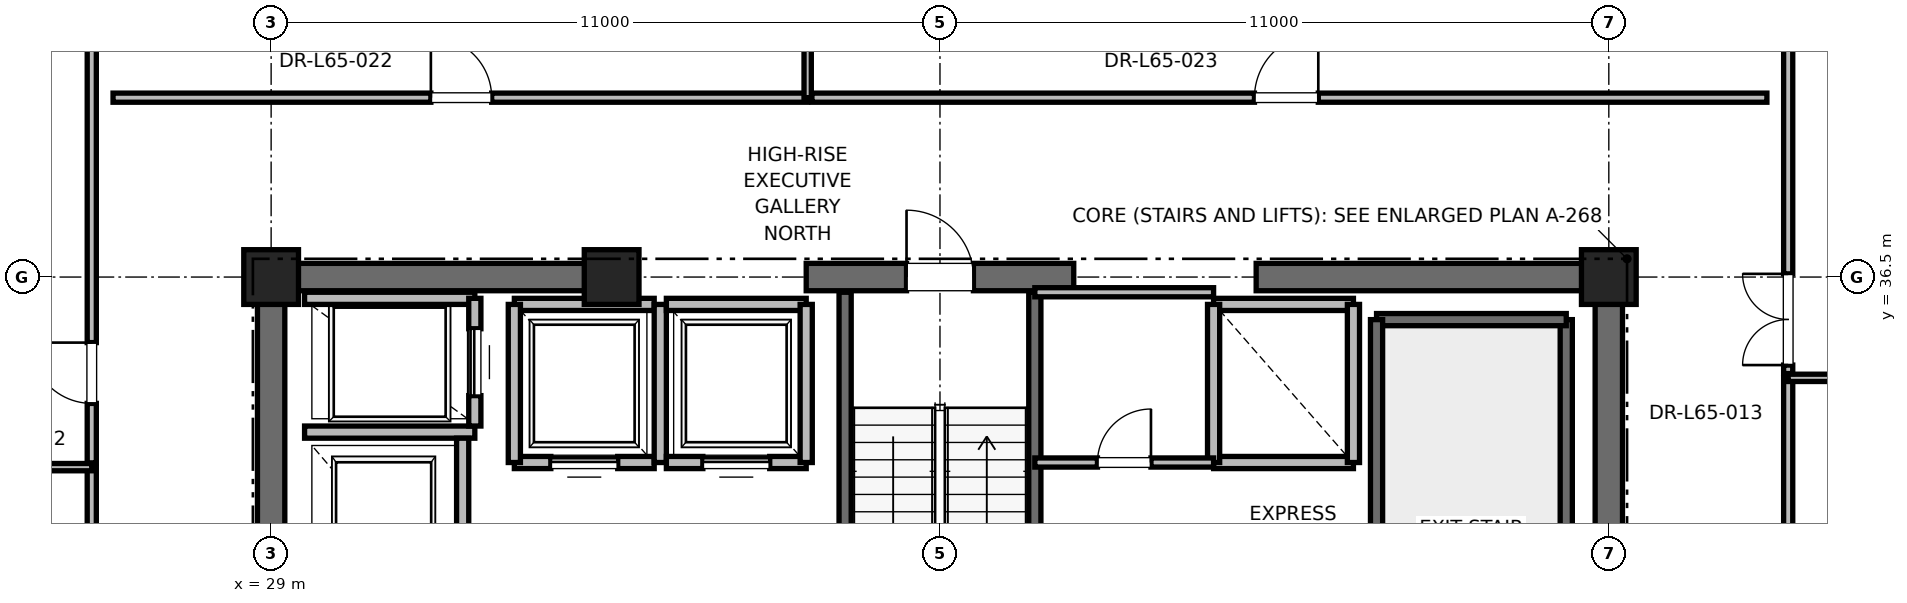
"""IFC4 building model, lengths in metres.
Left out: names, types, materials, properties, quantities, classifications, styles, units other than length and angle.
Written with IfcOpenShell. Run it as: python <this file> out.ifc"""

import sys

from ifc_helpers import new_model, si_unit, direction, frame, frame_2d, origin, origin_2d, place, context, subcontext, project, spatial, rectangle, extrude, element, fill, save


model = new_model("IFC4")
c1 = context("Model", 3, precision=1e-05, world=origin(), true_north=direction((0.0, 1.0)))
c2 = subcontext(c1, "Body", "Model", "MODEL_VIEW")
j1 = project(units=[si_unit("LENGTHUNIT", "METRE"), si_unit("PLANEANGLEUNIT", "RADIAN")], contexts=[c1])
p1 = place(None, origin())
s1 = spatial("IfcSite", under=j1, at=p1, CompositionType="ELEMENT")
p2 = place(p1, origin())
s2 = spatial("IfcBuilding", under=s1, at=p2, CompositionType="ELEMENT")
p3 = place(p2, frame((0.0, 0.0, 279.2)))
s3 = spatial("IfcBuildingStorey", under=s2, at=p3, CompositionType="ELEMENT", Elevation=279.2)
for number, where, z_axis, x_axis in (
    (1, (29.0, 36.5, 0.0), (0.0, 0.0, 1.0), (1.0, 0.0, 0.0)),
    (2, (51.0, 36.5, 0.0), (0.0, 0.0, 1.0), (1.0, 0.0, 0.0)),
    (3, (34.6, 36.5, 0.0), (0.0, 0.0, 1.0), (1.0, 0.0, 0.0)),
):
    element("IfcColumn", number, at=place(p3, frame(where, z_axis=z_axis, x_axis=x_axis)), inside=s3, PredefinedType="PILASTER", context=c2, shape_type="SweptSolid", body=[
        extrude(rectangle(XDim=0.9, YDim=0.9, at=origin_2d()), origin(), (0.0, 0.0, 1.0), 4.0),
    ])
p4 = place(p3, frame((29.0, 36.5, 0.0), z_axis=(0.0, 0.0, 1.0), x_axis=(1.0, 0.0, 0.0)))
e4 = element("IfcWall", 4, at=p4, inside=s3, PredefinedType="SHEAR", context=c2, shape_type="SweptSolid", body=[
    extrude(rectangle(XDim=5.8, YDim=0.45, at=frame_2d((2.9, 0.0))), origin(), (0.0, 0.0, 1.0), 3.785),
])
p5 = place(p3, frame((37.8, 36.5, 0.0), z_axis=(0.0, 0.0, 1.0), x_axis=(1.0, 0.0, 0.0)))
e5 = element("IfcWall", 5, at=p5, inside=s3, PredefinedType="SHEAR", context=c2, shape_type="SweptSolid", body=[
    extrude(rectangle(XDim=4.4, YDim=0.45, at=frame_2d((2.2, 0.0))), origin(), (0.0, 0.0, 1.0), 3.785),
])
p6 = place(p5, frame((1.65, 0.0, 0.0)))
e6 = element("IfcOpeningElement", 6, at=p6, cuts=e5, PredefinedType="OPENING", context=c2, shape_type="SweptSolid", body=[
    extrude(rectangle(XDim=1.1, YDim=2.15, at=frame_2d((0.55, 1.075))), frame((0.0, 0.225, 0.0), z_axis=(0.0, -1.0, 0.0), x_axis=(1.0, 0.0, 0.0)), (0.0, 0.0, 1.0), 0.45),
])
for number, where, z_axis, x_axis in (
    (7, (45.2, 36.5, 0.0), (0.0, 0.0, 1.0), (1.0, 0.0, 0.0)),
    (8, (29.0, 30.7, 0.0), (0.0, 0.0, 1.0), (0.0, 1.0, 0.0)),
):
    element("IfcWall", number, at=place(p3, frame(where, z_axis=z_axis, x_axis=x_axis)), inside=s3, PredefinedType="SHEAR", context=c2, shape_type="SweptSolid", body=[
        extrude(rectangle(XDim=5.8, YDim=0.45, at=frame_2d((2.9, 0.0))), origin(), (0.0, 0.0, 1.0), 3.785),
    ])
p7 = place(p3, frame((51.0, 27.7, 0.0), z_axis=(0.0, 0.0, 1.0), x_axis=(0.0, 1.0, 0.0)))
e9 = element("IfcWall", 9, at=p7, inside=s3, PredefinedType="SHEAR", context=c2, shape_type="SweptSolid", body=[
    extrude(rectangle(XDim=8.8, YDim=0.45, at=frame_2d((4.4, 0.0))), origin(), (0.0, 0.0, 1.0), 3.785),
])
p8 = place(p3, frame((50.3, 27.65, 0.0), z_axis=(0.0, 0.0, 1.0), x_axis=(0.0, 1.0, 0.0)))
e10 = element("IfcWall", 10, at=p8, inside=s3, PredefinedType="SOLIDWALL", context=c2, shape_type="SweptSolid", body=[
    extrude(rectangle(XDim=8.15, YDim=0.2, at=frame_2d((4.075, 0.0))), origin(), (0.0, 0.0, 1.0), 3.785),
])
p9 = place(p3, frame((47.18, 35.8, 0.0), z_axis=(0.0, 0.0, 1.0), x_axis=(1.0, 0.0, 0.0)))
e11 = element("IfcWall", 11, at=p9, inside=s3, PredefinedType="SOLIDWALL", context=c2, shape_type="SweptSolid", body=[
    extrude(rectangle(XDim=3.12, YDim=0.2, at=frame_2d((1.56, 0.0))), origin(), (0.0, 0.0, 1.0), 3.785),
])
p10 = place(p3, frame((47.18, 27.62, 0.0), z_axis=(0.0, 0.0, 1.0), x_axis=(0.0, 1.0, 0.0)))
e12 = element("IfcWall", 12, at=p10, inside=s3, PredefinedType="SOLIDWALL", context=c2, shape_type="SweptSolid", body=[
    extrude(rectangle(XDim=8.18, YDim=0.2, at=frame_2d((4.09, 0.0))), origin(), (0.0, 0.0, 1.0), 3.785),
])
p11 = place(p3, frame((38.44, 27.38, 0.0), z_axis=(0.0, 0.0, 1.0), x_axis=(0.0, 1.0, 0.0)))
e13 = element("IfcWall", 13, at=p11, inside=s3, PredefinedType="SOLIDWALL", context=c2, shape_type="SweptSolid", body=[
    extrude(rectangle(XDim=8.87, YDim=0.2, at=frame_2d((4.435, 0.0))), origin(), (0.0, 0.0, 1.0), 3.785),
])
p12 = place(p3, frame((41.56, 27.68, 0.0), z_axis=(0.0, 0.0, 1.0), x_axis=(0.0, 1.0, 0.0)))
e14 = element("IfcWall", 14, at=p12, inside=s3, PredefinedType="SOLIDWALL", context=c2, shape_type="SweptSolid", body=[
    extrude(rectangle(XDim=8.57, YDim=0.2, at=frame_2d((4.285, 0.0))), origin(), (0.0, 0.0, 1.0), 3.785),
])
p13 = place(p3, frame((29.55, 33.95, 0.0), z_axis=(0.0, 0.0, 1.0), x_axis=(1.0, 0.0, 0.0)))
e15 = element("IfcWall", 15, at=p13, inside=s3, PredefinedType="SOLIDWALL", context=c2, shape_type="SweptSolid", body=[
    extrude(rectangle(XDim=2.8, YDim=0.2, at=frame_2d((1.4, 0.0))), origin(), (0.0, 0.0, 1.0), 3.785),
])
p14 = place(p3, frame((32.15, 30.85, 0.0), z_axis=(0.0, 0.0, 1.0), x_axis=(0.0, 1.0, 0.0)))
e16 = element("IfcWall", 16, at=p14, inside=s3, PredefinedType="SOLIDWALL", context=c2, shape_type="SweptSolid", body=[
    extrude(rectangle(XDim=3.0, YDim=0.2, at=frame_2d((1.5, 0.0))), origin(), (0.0, 0.0, 1.0), 3.785),
])
p15 = place(p3, frame((32.35, 36.15, 0.0), z_axis=(0.0, 0.0, 1.0), x_axis=(-1.0, 0.0, 0.0)))
e17 = element("IfcWall", 17, at=p15, inside=s3, PredefinedType="SOLIDWALL", context=c2, shape_type="SweptSolid", body=[
    extrude(rectangle(XDim=2.8, YDim=0.2, at=frame_2d((1.4, 0.0))), origin(), (0.0, 0.0, 1.0), 3.148),
])
p16 = place(p3, frame((32.35, 34.05, 0.0), z_axis=(0.0, 0.0, 1.0), x_axis=(0.0, 1.0, 0.0)))
e18 = element("IfcWall", 18, at=p16, inside=s3, PredefinedType="SOLIDWALL", context=c2, shape_type="SweptSolid", body=[
    extrude(rectangle(XDim=2.1, YDim=0.2, at=frame_2d((1.05, 0.0))), origin(), (0.0, 0.0, 1.0), 3.785),
])
p17 = place(p16, frame((0.5, 0.0, 0.0)))
e19 = element("IfcOpeningElement", 19, at=p17, cuts=e18, PredefinedType="OPENING", context=c2, shape_type="SweptSolid", body=[
    extrude(rectangle(XDim=1.1, YDim=2.2, at=frame_2d((0.55, 1.1))), frame((0.0, 0.1, 0.0), z_axis=(0.0, -1.0, 0.0), x_axis=(1.0, 0.0, 0.0)), (0.0, 0.0, 1.0), 0.2),
])
p18 = place(p3, frame((33.0, 33.45, 0.0), z_axis=(0.0, 0.0, 1.0), x_axis=(1.0, 0.0, 0.0)))
e20 = element("IfcWall", 20, at=p18, inside=s3, PredefinedType="SOLIDWALL", context=c2, shape_type="SweptSolid", body=[
    extrude(rectangle(XDim=2.3, YDim=0.2, at=frame_2d((1.15, 0.0))), origin(), (0.0, 0.0, 1.0), 3.785),
])
p19 = place(p18, frame((0.6, 0.0, 0.0)))
e21 = element("IfcOpeningElement", 21, at=p19, cuts=e20, PredefinedType="OPENING", context=c2, shape_type="SweptSolid", body=[
    extrude(rectangle(XDim=1.1, YDim=2.2, at=frame_2d((0.55, 1.1))), frame((0.0, 0.1, 0.0), z_axis=(0.0, -1.0, 0.0), x_axis=(1.0, 0.0, 0.0)), (0.0, 0.0, 1.0), 0.2),
])
p20 = place(p3, frame((35.3, 36.05, 0.0), z_axis=(0.0, 0.0, 1.0), x_axis=(-1.0, 0.0, 0.0)))
e22 = element("IfcWall", 22, at=p20, inside=s3, PredefinedType="SOLIDWALL", context=c2, shape_type="SweptSolid", body=[
    extrude(rectangle(XDim=2.3, YDim=0.2, at=frame_2d((1.15, 0.0))), origin(), (0.0, 0.0, 1.0), 2.865),
])
p21 = place(p3, frame((33.0, 36.05, 0.0), z_axis=(0.0, 0.0, 1.0), x_axis=(0.0, -1.0, 0.0)))
e23 = element("IfcWall", 23, at=p21, inside=s3, PredefinedType="SOLIDWALL", context=c2, shape_type="SweptSolid", body=[
    extrude(rectangle(XDim=2.6, YDim=0.2, at=frame_2d((1.3, 0.0))), origin(), (0.0, 0.0, 1.0), 3.785),
])
p22 = place(p3, frame((35.4, 33.45, 0.0), z_axis=(0.0, 0.0, 1.0), x_axis=(0.0, 1.0, 0.0)))
e24 = element("IfcWall", 24, at=p22, inside=s3, PredefinedType="SOLIDWALL", context=c2, shape_type="SweptSolid", body=[
    extrude(rectangle(XDim=2.6, YDim=0.2, at=frame_2d((1.3, 0.0))), origin(), (0.0, 0.0, 1.0), 2.865),
])
p23 = place(p3, frame((35.5, 33.45, 0.0), z_axis=(0.0, 0.0, 1.0), x_axis=(1.0, 0.0, 0.0)))
e25 = element("IfcWall", 25, at=p23, inside=s3, PredefinedType="SOLIDWALL", context=c2, shape_type="SweptSolid", body=[
    extrude(rectangle(XDim=2.3, YDim=0.2, at=frame_2d((1.15, 0.0))), origin(), (0.0, 0.0, 1.0), 3.785),
])
p24 = place(p23, frame((0.6, 0.0, 0.0)))
e26 = element("IfcOpeningElement", 26, at=p24, cuts=e25, PredefinedType="OPENING", context=c2, shape_type="SweptSolid", body=[
    extrude(rectangle(XDim=1.1, YDim=2.2, at=frame_2d((0.55, 1.1))), frame((0.0, 0.1, 0.0), z_axis=(0.0, -1.0, 0.0), x_axis=(1.0, 0.0, 0.0)), (0.0, 0.0, 1.0), 0.2),
])
p25 = place(p3, frame((37.8, 36.05, 0.0), z_axis=(0.0, 0.0, 1.0), x_axis=(-1.0, 0.0, 0.0)))
e27 = element("IfcWall", 27, at=p25, inside=s3, PredefinedType="SOLIDWALL", context=c2, shape_type="SweptSolid", body=[
    extrude(rectangle(XDim=2.3, YDim=0.2, at=frame_2d((1.15, 0.0))), origin(), (0.0, 0.0, 1.0), 2.865),
])
p26 = place(p3, frame((37.8, 33.45, 0.0), z_axis=(0.0, 0.0, 1.0), x_axis=(0.0, 1.0, 0.0)))
e28 = element("IfcWall", 28, at=p26, inside=s3, PredefinedType="SOLIDWALL", context=c2, shape_type="SweptSolid", body=[
    extrude(rectangle(XDim=2.6, YDim=0.2, at=frame_2d((1.3, 0.0))), origin(), (0.0, 0.0, 1.0), 2.865),
])
p27 = place(p3, frame((44.5, 33.45, 0.0), z_axis=(0.0, 0.0, 1.0), x_axis=(1.0, 0.0, 0.0)))
e29 = element("IfcWall", 29, at=p27, inside=s3, PredefinedType="SOLIDWALL", context=c2, shape_type="SweptSolid", body=[
    extrude(rectangle(XDim=2.3, YDim=0.2, at=frame_2d((1.15, 0.0))), origin(), (0.0, 0.0, 1.0), 3.785),
])
p28 = place(p3, frame((46.8, 36.05, 0.0), z_axis=(0.0, 0.0, 1.0), x_axis=(-1.0, 0.0, 0.0)))
e30 = element("IfcWall", 30, at=p28, inside=s3, PredefinedType="SOLIDWALL", context=c2, shape_type="SweptSolid", body=[
    extrude(rectangle(XDim=2.3, YDim=0.2, at=frame_2d((1.15, 0.0))), origin(), (0.0, 0.0, 1.0), 2.865),
])
p29 = place(p3, frame((44.5, 36.05, 0.0), z_axis=(0.0, 0.0, 1.0), x_axis=(0.0, -1.0, 0.0)))
e31 = element("IfcWall", 31, at=p29, inside=s3, PredefinedType="SOLIDWALL", context=c2, shape_type="SweptSolid", body=[
    extrude(rectangle(XDim=2.6, YDim=0.2, at=frame_2d((1.3, 0.0))), origin(), (0.0, 0.0, 1.0), 2.865),
])
p30 = place(p3, frame((46.8, 33.45, 0.0), z_axis=(0.0, 0.0, 1.0), x_axis=(0.0, 1.0, 0.0)))
e32 = element("IfcWall", 32, at=p30, inside=s3, PredefinedType="SOLIDWALL", context=c2, shape_type="SweptSolid", body=[
    extrude(rectangle(XDim=2.6, YDim=0.2, at=frame_2d((1.3, 0.0))), origin(), (0.0, 0.0, 1.0), 3.785),
])
p31 = place(p3, frame((41.56, 36.25, 0.0), z_axis=(0.0, 0.0, 1.0), x_axis=(1.0, 0.0, 0.0)))
e33 = element("IfcWall", 33, at=p31, inside=s3, PredefinedType="PARTITIONING", context=c2, shape_type="SweptSolid", body=[
    extrude(rectangle(XDim=2.94, YDim=0.15, at=frame_2d((1.47, 0.0))), origin(), (0.0, 0.0, 1.0), 2.85),
])
p32 = place(p3, frame((41.56, 33.45, 0.0), z_axis=(0.0, 0.0, 1.0), x_axis=(1.0, 0.0, 0.0)))
e34 = element("IfcWall", 34, at=p32, inside=s3, PredefinedType="PARTITIONING", context=c2, shape_type="SweptSolid", body=[
    extrude(rectangle(XDim=2.94, YDim=0.15, at=frame_2d((1.47, 0.0))), origin(), (0.0, 0.0, 1.0), 2.85),
])
p33 = place(p32, frame((1.03, 0.0, 0.0)))
e35 = element("IfcOpeningElement", 35, at=p33, cuts=e34, PredefinedType="OPENING", context=c2, shape_type="SweptSolid", body=[
    extrude(rectangle(XDim=0.88, YDim=2.1, at=frame_2d((0.44, 1.05))), frame((0.0, 0.075, 0.0), z_axis=(0.0, -1.0, 0.0), x_axis=(1.0, 0.0, 0.0)), (0.0, 0.0, 1.0), 0.15),
])
p34 = place(p3, frame((26.4, 39.45, 0.0), z_axis=(0.0, 0.0, 1.0), x_axis=(1.0, 0.0, 0.0)))
e36 = element("IfcWall", 36, at=p34, inside=s3, PredefinedType="PARTITIONING", context=c2, shape_type="SweptSolid", body=[
    extrude(rectangle(XDim=11.424, YDim=0.15, at=frame_2d((5.712, 0.0))), origin(), (0.0, 0.0, 1.0), 2.85),
])
p35 = place(p34, frame((5.227, 0.0, 0.0)))
e37 = element("IfcOpeningElement", 37, at=p35, cuts=e36, PredefinedType="OPENING", context=c2, shape_type="SweptSolid", body=[
    extrude(rectangle(XDim=1.0, YDim=2.15, at=frame_2d((0.5, 1.075))), frame((0.0, 0.075, 0.0), z_axis=(0.0, -1.0, 0.0), x_axis=(1.0, 0.0, 0.0)), (0.0, 0.0, 1.0), 0.15),
])
p36 = place(p3, frame((37.824, 39.45, 0.0), z_axis=(0.0, 0.0, 1.0), x_axis=(0.0, 1.0, 0.0)))
e38 = element("IfcWall", 38, at=p36, inside=s3, PredefinedType="PARTITIONING", context=c2, shape_type="SweptSolid", body=[
    extrude(rectangle(XDim=10.206, YDim=0.12, at=frame_2d((5.103, 0.0))), origin(), (0.0, 0.0, 1.0), 2.415),
])
p37 = place(p3, frame((37.894, 39.45, 0.0), z_axis=(0.0, 0.0, 1.0), x_axis=(1.0, 0.0, 0.0)))
e39 = element("IfcWall", 39, at=p37, inside=s3, PredefinedType="PARTITIONING", context=c2, shape_type="SweptSolid", body=[
    extrude(rectangle(XDim=15.706, YDim=0.15, at=frame_2d((7.853, 0.0))), origin(), (0.0, 0.0, 1.0), 2.85),
])
p38 = place(p37, frame((7.278, 0.0, 0.0)))
e40 = element("IfcOpeningElement", 40, at=p38, cuts=e39, PredefinedType="OPENING", context=c2, shape_type="SweptSolid", body=[
    extrude(rectangle(XDim=1.05, YDim=2.2, at=frame_2d((0.525, 1.1))), frame((0.0, 0.075, 0.0), z_axis=(0.0, -1.0, 0.0), x_axis=(1.0, 0.0, 0.0)), (0.0, 0.0, 1.0), 0.15),
])
p39 = place(p3, frame((26.05, 20.228, 0.0), z_axis=(0.0, 0.0, 1.0), x_axis=(0.0, 1.0, 0.0)))
e41 = element("IfcWall", 41, at=p39, inside=s3, PredefinedType="PARTITIONING", context=c2, shape_type="SweptSolid", body=[
    extrude(rectangle(XDim=13.146, YDim=0.15, at=frame_2d((6.573, 0.0))), origin(), (0.0, 0.0, 1.0), 2.85),
])
p40 = place(p39, frame((6.038, 0.0, 0.0)))
e42 = element("IfcOpeningElement", 42, at=p40, cuts=e41, PredefinedType="OPENING", context=c2, shape_type="SweptSolid", body=[
    extrude(rectangle(XDim=1.0, YDim=2.15, at=frame_2d((0.5, 1.075))), frame((0.0, 0.075, 0.0), z_axis=(0.0, -1.0, 0.0), x_axis=(1.0, 0.0, 0.0)), (0.0, 0.0, 1.0), 0.15),
])
p41 = place(p3, frame((14.29, 33.374, 0.0), z_axis=(0.0, 0.0, 1.0), x_axis=(1.0, 0.0, 0.0)))
e43 = element("IfcWall", 43, at=p41, inside=s3, PredefinedType="PARTITIONING", context=c2, shape_type="SweptSolid", body=[
    extrude(rectangle(XDim=11.76, YDim=0.12, at=frame_2d((5.88, 0.0))), origin(), (0.0, 0.0, 1.0), 2.85),
])
p42 = place(p3, frame((26.05, 33.444, 0.0), z_axis=(0.0, 0.0, 1.0), x_axis=(0.0, 1.0, 0.0)))
e44 = element("IfcWall", 44, at=p42, inside=s3, PredefinedType="PARTITIONING", context=c2, shape_type="SweptSolid", body=[
    extrude(rectangle(XDim=12.412, YDim=0.15, at=frame_2d((6.206, 0.0))), origin(), (0.0, 0.0, 1.0), 2.85),
])
p43 = place(p42, frame((0.978, 0.0, 0.0)))
e45 = element("IfcOpeningElement", 45, at=p43, cuts=e44, PredefinedType="OPENING", context=c2, shape_type="SweptSolid", body=[
    extrude(rectangle(XDim=1.0, YDim=2.15, at=frame_2d((0.5, 1.075))), frame((0.0, 0.075, 0.0), z_axis=(0.0, -1.0, 0.0), x_axis=(1.0, 0.0, 0.0)), (0.0, 0.0, 1.0), 0.15),
])
p44 = place(p3, frame((53.95, 22.43, 0.0), z_axis=(0.0, 0.0, 1.0), x_axis=(0.0, 1.0, 0.0)))
e46 = element("IfcWall", 46, at=p44, inside=s3, PredefinedType="PARTITIONING", context=c2, shape_type="SweptSolid", body=[
    extrude(rectangle(XDim=12.412, YDim=0.15, at=frame_2d((6.206, 0.0))), origin(), (0.0, 0.0, 1.0), 2.85),
])
p45 = place(p44, frame((5.646, 0.0, 0.0)))
e47 = element("IfcOpeningElement", 47, at=p45, cuts=e46, PredefinedType="OPENING", context=c2, shape_type="SweptSolid", body=[
    extrude(rectangle(XDim=1.05, YDim=2.2, at=frame_2d((0.525, 1.1))), frame((0.0, 0.075, 0.0), z_axis=(0.0, -1.0, 0.0), x_axis=(1.0, 0.0, 0.0)), (0.0, 0.0, 1.0), 0.15),
])
p46 = place(p3, frame((53.95, 34.843, 0.0), z_axis=(0.0, 0.0, 1.0), x_axis=(1.0, 0.0, 0.0)))
e48 = element("IfcWall", 48, at=p46, inside=s3, PredefinedType="PARTITIONING", context=c2, shape_type="SweptSolid", body=[
    extrude(rectangle(XDim=11.76, YDim=0.12, at=frame_2d((5.88, 0.0))), origin(), (0.0, 0.0, 1.0), 2.85),
])
p47 = place(p3, frame((53.95, 34.913, 0.0), z_axis=(0.0, 0.0, 1.0), x_axis=(0.0, 1.0, 0.0)))
e49 = element("IfcWall", 49, at=p47, inside=s3, PredefinedType="PARTITIONING", context=c2, shape_type="SweptSolid", body=[
    extrude(rectangle(XDim=10.944, YDim=0.15, at=frame_2d((5.472, 0.0))), origin(), (0.0, 0.0, 1.0), 2.85),
])
p48 = place(p47, frame((0.14, 0.0, 0.0)))
e50 = element("IfcOpeningElement", 50, at=p48, cuts=e49, PredefinedType="OPENING", context=c2, shape_type="SweptSolid", body=[
    extrude(rectangle(XDim=1.5, YDim=2.25, at=frame_2d((0.75, 1.125))), frame((0.0, 0.075, 0.0), z_axis=(0.0, -1.0, 0.0), x_axis=(1.0, 0.0, 0.0)), (0.0, 0.0, 1.0), 0.15),
])
p49 = place(p6, origin())
e51 = element("IfcDoor", 51, at=p49, inside=s3, OperationType="SINGLE_SWING_LEFT", PredefinedType="DOOR", context=c2, shape_type="SweptSolid", body=[
    extrude(rectangle(XDim=1.1, YDim=2.15, at=frame_2d((0.55, 1.075))), frame((0.0, 0.025, 0.0), z_axis=(0.0, -1.0, 0.0), x_axis=(1.0, 0.0, 0.0)), (0.0, 0.0, 1.0), 0.05),
])
fill(e6, e51)
p50 = place(p17, origin())
e52 = element("IfcDoor", 52, at=p50, inside=s3, OperationType="SLIDING_TO_RIGHT", PredefinedType="DOOR", context=c2, shape_type="SweptSolid", body=[
    extrude(rectangle(XDim=1.1, YDim=2.2, at=frame_2d((0.55, 1.1))), frame((0.0, 0.025, 0.0), z_axis=(0.0, -1.0, 0.0), x_axis=(1.0, 0.0, 0.0)), (0.0, 0.0, 1.0), 0.05),
])
fill(e19, e52)
p51 = place(p19, origin())
e53 = element("IfcDoor", 53, at=p51, inside=s3, OperationType="SLIDING_TO_RIGHT", PredefinedType="DOOR", context=c2, shape_type="SweptSolid", body=[
    extrude(rectangle(XDim=1.1, YDim=2.2, at=frame_2d((0.55, 1.1))), frame((0.0, 0.025, 0.0), z_axis=(0.0, -1.0, 0.0), x_axis=(1.0, 0.0, 0.0)), (0.0, 0.0, 1.0), 0.05),
])
fill(e21, e53)
p52 = place(p24, origin())
e54 = element("IfcDoor", 54, at=p52, inside=s3, OperationType="SLIDING_TO_RIGHT", PredefinedType="DOOR", context=c2, shape_type="SweptSolid", body=[
    extrude(rectangle(XDim=1.1, YDim=2.2, at=frame_2d((0.55, 1.1))), frame((0.0, 0.025, 0.0), z_axis=(0.0, -1.0, 0.0), x_axis=(1.0, 0.0, 0.0)), (0.0, 0.0, 1.0), 0.05),
])
fill(e26, e54)
p53 = place(p33, origin())
e55 = element("IfcDoor", 55, at=p53, inside=s3, OperationType="SINGLE_SWING_RIGHT", PredefinedType="DOOR", context=c2, shape_type="SweptSolid", body=[
    extrude(rectangle(XDim=0.88, YDim=2.1, at=frame_2d((0.44, 1.05))), frame((0.0, 0.025, 0.0), z_axis=(0.0, -1.0, 0.0), x_axis=(1.0, 0.0, 0.0)), (0.0, 0.0, 1.0), 0.05),
])
fill(e35, e55)
p54 = place(p35, origin())
e56 = element("IfcDoor", 56, at=p54, inside=s3, OperationType="SINGLE_SWING_LEFT", PredefinedType="DOOR", context=c2, shape_type="SweptSolid", body=[
    extrude(rectangle(XDim=1.0, YDim=2.15, at=frame_2d((0.5, 1.075))), frame((0.0, 0.025, 0.0), z_axis=(0.0, -1.0, 0.0), x_axis=(1.0, 0.0, 0.0)), (0.0, 0.0, 1.0), 0.05),
])
fill(e37, e56)
p55 = place(p38, origin())
e57 = element("IfcDoor", 57, at=p55, inside=s3, OperationType="SINGLE_SWING_RIGHT", PredefinedType="DOOR", context=c2, shape_type="SweptSolid", body=[
    extrude(rectangle(XDim=1.05, YDim=2.2, at=frame_2d((0.525, 1.1))), frame((0.0, 0.025, 0.0), z_axis=(0.0, -1.0, 0.0), x_axis=(1.0, 0.0, 0.0)), (0.0, 0.0, 1.0), 0.05),
])
fill(e40, e57)
p56 = place(p43, origin())
e58 = element("IfcDoor", 58, at=p56, inside=s3, OperationType="SINGLE_SWING_RIGHT", PredefinedType="DOOR", context=c2, shape_type="SweptSolid", body=[
    extrude(rectangle(XDim=1.0, YDim=2.15, at=frame_2d((0.5, 1.075))), frame((0.0, 0.025, 0.0), z_axis=(0.0, -1.0, 0.0), x_axis=(1.0, 0.0, 0.0)), (0.0, 0.0, 1.0), 0.05),
])
fill(e45, e58)
p57 = place(p48, origin())
e59 = element("IfcDoor", 59, at=p57, inside=s3, OperationType="DOUBLE_DOOR_SINGLE_SWING", PredefinedType="DOOR", context=c2, shape_type="SweptSolid", body=[
    extrude(rectangle(XDim=1.5, YDim=2.25, at=frame_2d((0.75, 1.125))), frame((0.0, 0.025, 0.0), z_axis=(0.0, -1.0, 0.0), x_axis=(1.0, 0.0, 0.0)), (0.0, 0.0, 1.0), 0.05),
])
fill(e50, e59)
save(model, sys.argv[1])
